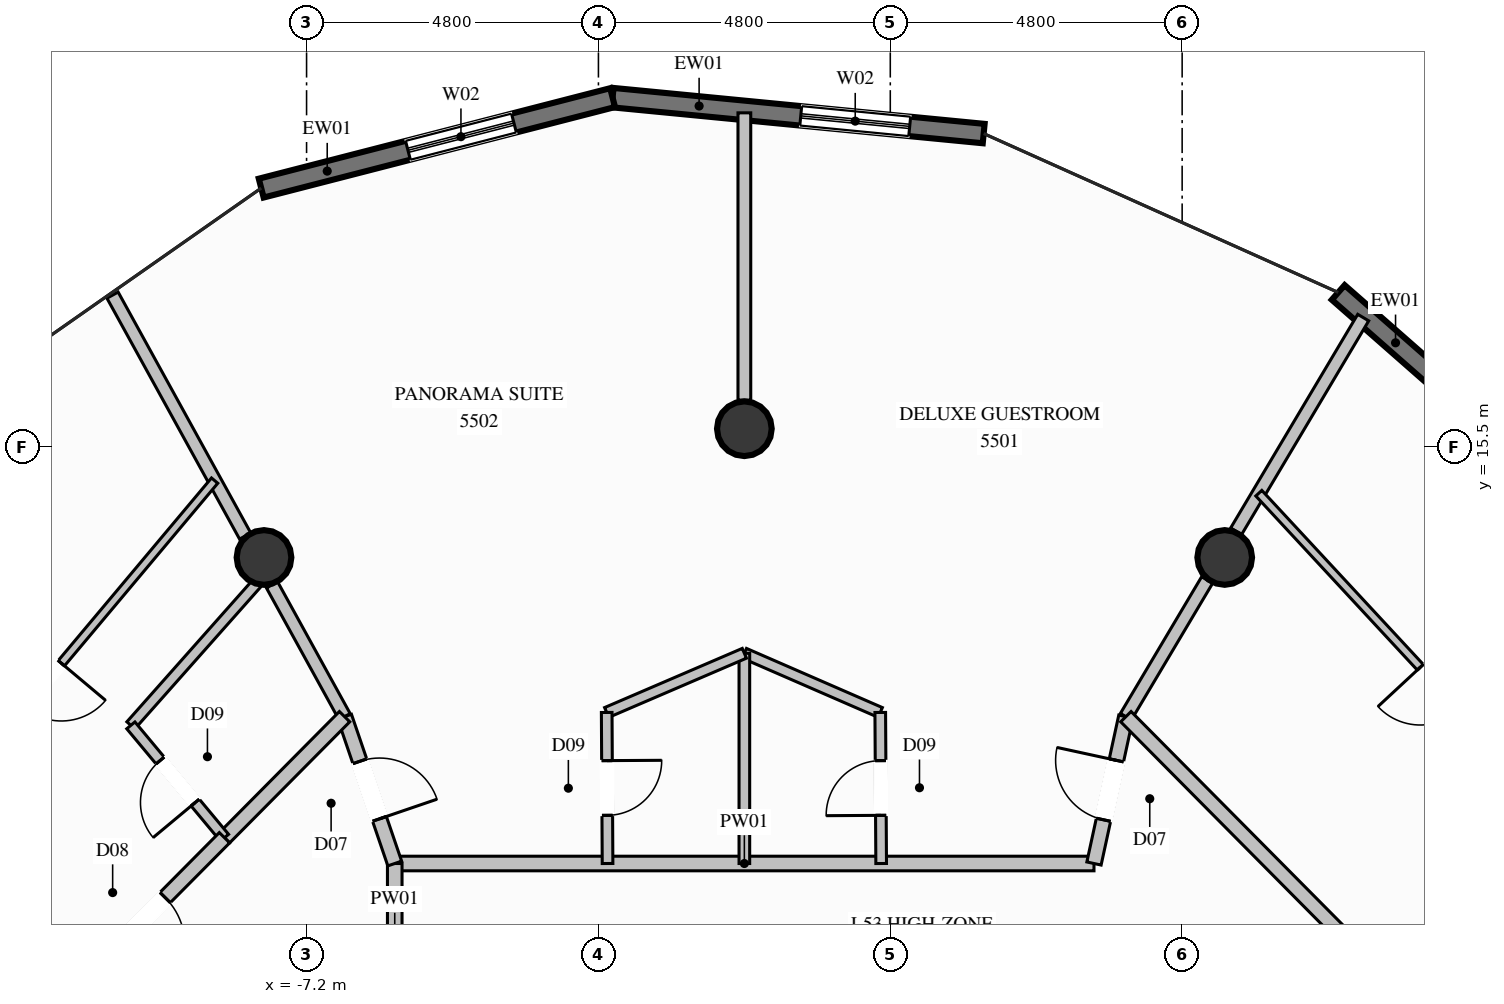
"""IFC4 building model, lengths in metres.
Left out: names, types, materials, properties, quantities, classifications, styles, units other than length and angle.
Written with IfcOpenShell. Run it as: python <this file> out.ifc"""

import sys

from ifc_helpers import new_model, si_unit, direction, frame, frame_2d, origin, origin_2d, place, context, subcontext, project, spatial, rectangle, circle, extrude, element, fill, save


model = new_model("IFC4")
c1 = context("Model", 3, precision=1e-05, world=origin(), true_north=direction((0.0, 1.0)))
c2 = subcontext(c1, "Body", "Model", "MODEL_VIEW")
j1 = project(units=[si_unit("LENGTHUNIT", "METRE"), si_unit("PLANEANGLEUNIT", "RADIAN")], contexts=[c1])
p1 = place(None, origin())
s1 = spatial("IfcSite", under=j1, at=p1, CompositionType="ELEMENT")
p2 = place(p1, origin())
s2 = spatial("IfcBuilding", under=s1, at=p2, CompositionType="ELEMENT")
p3 = place(p2, frame((0.0, 0.0, 205.6)))
s3 = spatial("IfcBuildingStorey", under=s2, at=p3, CompositionType="ELEMENT", Elevation=205.6)
for number, where, z_axis, x_axis in (
    (1, (7.9, 13.683, 0.0), (0.0, 0.0, 1.0), (1.0, 0.0, 0.0)),
    (2, (0.0, 15.8, 0.0), (0.0, 0.0, 1.0), (1.0, 0.0, 0.0)),
    (3, (-7.9, 13.683, 0.0), (0.0, 0.0, 1.0), (1.0, 0.0, 0.0)),
):
    element("IfcColumn", number, at=place(p3, frame(where, z_axis=z_axis, x_axis=x_axis)), inside=s3, PredefinedType="COLUMN", context=c2, shape_type="SweptSolid", body=[
        extrude(circle(Radius=0.45, at=origin_2d()), origin(), (0.0, 0.0, 1.0), 3.6),
    ])
p4 = place(p3, frame((9.767, 18.041, 0.0), z_axis=(0.0, 0.0, 1.0), x_axis=(0.751422430331, -0.659821438873, 0.0)))
e4 = element("IfcWall", 4, at=p4, inside=s3, PredefinedType="SOLIDWALL", context=c2, shape_type="SweptSolid", body=[
    extrude(rectangle(XDim=6.636, YDim=0.32, at=frame_2d((3.318, 0.0))), origin(), (0.0, 0.0, 1.0), 3.36),
])
p5 = place(p4, frame((2.759, 0.0, 0.35)))
e5 = element("IfcOpeningElement", 5, at=p5, cuts=e4, PredefinedType="OPENING", context=c2, shape_type="SweptSolid", body=[
    extrude(rectangle(XDim=1.8, YDim=2.6, at=frame_2d((0.9, 1.3))), frame((0.0, 0.17, 0.0), z_axis=(0.0, -1.0, 0.0), x_axis=(1.0, 0.0, 0.0)), (0.0, 0.0, 1.0), 0.34),
])
p6 = place(p3, frame((-2.167, 21.245, 0.0), z_axis=(0.0, 0.0, 1.0), x_axis=(0.995342991644, -0.096396727049, 0.0)))
e6 = element("IfcWall", 6, at=p6, inside=s3, PredefinedType="SOLIDWALL", context=c2, shape_type="SweptSolid", body=[
    extrude(rectangle(XDim=6.132, YDim=0.32, at=frame_2d((3.066, 0.0))), origin(), (0.0, 0.0, 1.0), 3.36),
])
p7 = place(p6, frame((3.109, 0.0, 0.35)))
e7 = element("IfcOpeningElement", 7, at=p7, cuts=e6, PredefinedType="OPENING", context=c2, shape_type="SweptSolid", body=[
    extrude(rectangle(XDim=1.8, YDim=2.6, at=frame_2d((0.9, 1.3))), frame((0.0, 0.17, 0.0), z_axis=(0.0, -1.0, 0.0), x_axis=(1.0, 0.0, 0.0)), (0.0, 0.0, 1.0), 0.34),
])
p8 = place(p3, frame((-7.946, 19.757, 0.0), z_axis=(0.0, 0.0, 1.0), x_axis=(0.968412249537, 0.249354596803, 0.0)))
e8 = element("IfcWall", 8, at=p8, inside=s3, PredefinedType="SOLIDWALL", context=c2, shape_type="SweptSolid", body=[
    extrude(rectangle(XDim=5.968, YDim=0.32, at=frame_2d((2.984, 0.0))), origin(), (0.0, 0.0, 1.0), 3.36),
])
p9 = place(p8, frame((2.492, 0.0, 0.35)))
e9 = element("IfcOpeningElement", 9, at=p9, cuts=e8, PredefinedType="OPENING", context=c2, shape_type="SweptSolid", body=[
    extrude(rectangle(XDim=1.8, YDim=2.6, at=frame_2d((0.9, 1.3))), frame((0.0, 0.17, 0.0), z_axis=(0.0, -1.0, 0.0), x_axis=(1.0, 0.0, 0.0)), (0.0, 0.0, 1.0), 0.34),
])
p10 = place(p3, frame((-5.75, 8.65, 0.0), z_axis=(0.0, 0.0, 1.0), x_axis=(1.0, 0.0, 0.0)))
e10 = element("IfcWall", 10, at=p10, inside=s3, PredefinedType="PARTITIONING", context=c2, shape_type="SweptSolid", body=[
    extrude(rectangle(XDim=11.5, YDim=0.24, at=frame_2d((5.75, 0.0))), origin(), (0.0, 0.0, 1.0), 3.36),
])
p11 = place(p3, frame((-5.75, 6.1, 0.0), z_axis=(0.0, 0.0, 1.0), x_axis=(0.0, 1.0, 0.0)))
e11 = element("IfcWall", 11, at=p11, inside=s3, PredefinedType="PARTITIONING", context=c2, shape_type="SweptSolid", body=[
    extrude(rectangle(XDim=2.55, YDim=0.24, at=frame_2d((1.275, 0.0))), origin(), (0.0, 0.0, 1.0), 3.36),
])
p12 = place(p3, frame((6.275, 11.065, 0.0), z_axis=(0.0, 0.0, 1.0), x_axis=(0.511099633632, 0.859521474136, 0.0)))
e12 = element("IfcWall", 12, at=p12, inside=s3, PredefinedType="PARTITIONING", context=c2, shape_type="SweptSolid", body=[
    extrude(rectangle(XDim=2.614, YDim=0.21, at=frame_2d((1.307, 0.0))), origin(), (0.0, 0.0, 1.0), 2.877),
])
p13 = place(p3, frame((8.088, 14.114, 0.0), z_axis=(0.0, 0.0, 1.0), x_axis=(0.511207736288, 0.859457183552, 0.0)))
e13 = element("IfcWall", 13, at=p13, inside=s3, PredefinedType="PARTITIONING", context=c2, shape_type="SweptSolid", body=[
    extrude(rectangle(XDim=4.089, YDim=0.21, at=frame_2d((2.044, 0.0))), origin(), (0.0, 0.0, 1.0), 3.36),
])
p14 = place(p3, frame((-6.575, 11.065, 0.0), z_axis=(0.0, 0.0, 1.0), x_axis=(-0.482312715348, 0.875999112222, 0.0)))
e14 = element("IfcWall", 14, at=p14, inside=s3, PredefinedType="PARTITIONING", context=c2, shape_type="SweptSolid", body=[
    extrude(rectangle(XDim=2.474, YDim=0.21, at=frame_2d((1.237, 0.0))), origin(), (0.0, 0.0, 1.0), 2.877),
])
p15 = place(p3, frame((-8.21, 14.036, 0.0), z_axis=(0.0, 0.0, 1.0), x_axis=(-0.482343563711, 0.875982126842, 0.0)))
e15 = element("IfcWall", 15, at=p15, inside=s3, PredefinedType="PARTITIONING", context=c2, shape_type="SweptSolid", body=[
    extrude(rectangle(XDim=4.522, YDim=0.21, at=frame_2d((2.261, 0.0))), origin(), (0.0, 0.0, 1.0), 3.36),
])
p16 = place(p3, frame((0.0, 12.107, 0.0), z_axis=(0.0, 0.0, 1.0), x_axis=(0.916902788215, -0.399110607431, 0.0)))
e16 = element("IfcWall", 16, at=p16, inside=s3, PredefinedType="PLUMBINGWALL", context=c2, shape_type="SweptSolid", body=[
    extrude(rectangle(XDim=2.438, YDim=0.175, at=frame_2d((1.219, 0.0))), origin(), (0.0, 0.0, 1.0), 3.36),
])
p17 = place(p3, frame((0.0, 12.107, 0.0), z_axis=(0.0, 0.0, 1.0), x_axis=(0.0, -1.0, 0.0)))
e17 = element("IfcWall", 17, at=p17, inside=s3, PredefinedType="PLUMBINGWALL", context=c2, shape_type="SweptSolid", body=[
    extrude(rectangle(XDim=3.457, YDim=0.175, at=frame_2d((1.729, 0.0))), origin(), (0.0, 0.0, 1.0), 3.36),
])
p18 = place(p3, frame((2.25, 8.65, 0.0), z_axis=(0.0, 0.0, 1.0), x_axis=(-0.005994978263, 0.999982029956, 0.0)))
e18 = element("IfcWall", 18, at=p18, inside=s3, PredefinedType="PLUMBINGWALL", context=c2, shape_type="SweptSolid", body=[
    extrude(rectangle(XDim=2.484, YDim=0.175, at=frame_2d((1.242, 0.0))), origin(), (0.0, 0.0, 1.0), 3.36),
])
p19 = place(p18, frame((0.792, 0.0, 0.0)))
e19 = element("IfcOpeningElement", 19, at=p19, cuts=e18, PredefinedType="OPENING", context=c2, shape_type="SweptSolid", body=[
    extrude(rectangle(XDim=0.9, YDim=2.1, at=frame_2d((0.45, 1.05))), frame((0.0, 0.098, 0.0), z_axis=(0.0, -1.0, 0.0), x_axis=(1.0, 0.0, 0.0)), (0.0, 0.0, 1.0), 0.195),
])
p20 = place(p3, frame((0.0, 16.27, 0.0), z_axis=(0.0, 0.0, 1.0), x_axis=(0.0, 1.0, 0.0)))
e20 = element("IfcWall", 20, at=p20, inside=s3, PredefinedType="PARTITIONING", context=c2, shape_type="SweptSolid", body=[
    extrude(rectangle(XDim=4.725, YDim=0.21, at=frame_2d((2.363, 0.0))), origin(), (0.0, 0.0, 1.0), 3.36),
])
p21 = place(p3, frame((5.75, 8.65, 0.0), z_axis=(0.0, 0.0, 1.0), x_axis=(0.212388632151, 0.977185278713, 0.0)))
e21 = element("IfcWall", 21, at=p21, inside=s3, PredefinedType="PARTITIONING", context=c2, shape_type="SweptSolid", body=[
    extrude(rectangle(XDim=2.471, YDim=0.24, at=frame_2d((1.236, 0.0))), origin(), (0.0, 0.0, 1.0), 3.36),
])
p22 = place(p21, frame((0.736, 0.0, 0.0)))
e22 = element("IfcOpeningElement", 22, at=p22, cuts=e21, PredefinedType="OPENING", context=c2, shape_type="SweptSolid", body=[
    extrude(rectangle(XDim=1.0, YDim=2.2, at=frame_2d((0.5, 1.1))), frame((0.0, 0.13, 0.0), z_axis=(0.0, -1.0, 0.0), x_axis=(1.0, 0.0, 0.0)), (0.0, 0.0, 1.0), 0.26),
])
p23 = place(p3, frame((-2.264, 11.134, 0.0), z_axis=(0.0, 0.0, 1.0), x_axis=(0.918755099671, 0.3948278952, 0.0)))
e23 = element("IfcWall", 23, at=p23, inside=s3, PredefinedType="PLUMBINGWALL", context=c2, shape_type="SweptSolid", body=[
    extrude(rectangle(XDim=2.464, YDim=0.175, at=frame_2d((1.232, 0.0))), origin(), (0.0, 0.0, 1.0), 3.36),
])
p24 = place(p3, frame((-2.264, 11.134, 0.0), z_axis=(0.0, 0.0, 1.0), x_axis=(0.005601877704, -0.99998430936, 0.0)))
e24 = element("IfcWall", 24, at=p24, inside=s3, PredefinedType="PLUMBINGWALL", context=c2, shape_type="SweptSolid", body=[
    extrude(rectangle(XDim=2.484, YDim=0.175, at=frame_2d((1.242, 0.0))), origin(), (0.0, 0.0, 1.0), 3.36),
])
p25 = place(p24, frame((0.792, 0.0, 0.0)))
e25 = element("IfcOpeningElement", 25, at=p25, cuts=e24, PredefinedType="OPENING", context=c2, shape_type="SweptSolid", body=[
    extrude(rectangle(XDim=0.9, YDim=2.1, at=frame_2d((0.45, 1.05))), frame((0.0, 0.098, 0.0), z_axis=(0.0, -1.0, 0.0), x_axis=(1.0, 0.0, 0.0)), (0.0, 0.0, 1.0), 0.195),
])
p26 = place(p3, frame((-6.575, 11.065, 0.0), z_axis=(0.0, 0.0, 1.0), x_axis=(0.323250422642, -0.946313459833, 0.0)))
e26 = element("IfcWall", 26, at=p26, inside=s3, PredefinedType="PARTITIONING", context=c2, shape_type="SweptSolid", body=[
    extrude(rectangle(XDim=2.552, YDim=0.24, at=frame_2d((1.276, 0.0))), origin(), (0.0, 0.0, 1.0), 3.36),
])
p27 = place(p26, frame((0.776, 0.0, 0.0)))
e27 = element("IfcOpeningElement", 27, at=p27, cuts=e26, PredefinedType="OPENING", context=c2, shape_type="SweptSolid", body=[
    extrude(rectangle(XDim=1.0, YDim=2.2, at=frame_2d((0.5, 1.1))), frame((0.0, 0.13, 0.0), z_axis=(0.0, -1.0, 0.0), x_axis=(1.0, 0.0, 0.0)), (0.0, 0.0, 1.0), 0.26),
])
p28 = place(p3, frame((-6.575, 11.065, 0.0), z_axis=(0.0, 0.0, 1.0), x_axis=(-0.704271845888, -0.709930395947, 0.0)))
e28 = element("IfcWall", 28, at=p28, inside=s3, PredefinedType="PARTITIONING", context=c2, shape_type="SweptSolid", body=[
    extrude(rectangle(XDim=2.804, YDim=0.24, at=frame_2d((1.402, 0.0))), origin(), (0.0, 0.0, 1.0), 3.36),
])
p29 = place(p3, frame((-7.872, 13.422, 0.0), z_axis=(0.0, 0.0, 1.0), x_axis=(-0.663660752153, -0.748033693126, 0.0)))
e29 = element("IfcWall", 29, at=p29, inside=s3, PredefinedType="PLUMBINGWALL", context=c2, shape_type="SweptSolid", body=[
    extrude(rectangle(XDim=3.342, YDim=0.175, at=frame_2d((1.671, 0.0))), origin(), (0.0, 0.0, 1.0), 2.929),
])
p30 = place(p3, frame((-8.55, 9.074, 0.0), z_axis=(0.0, 0.0, 1.0), x_axis=(-0.640164435278, 0.768237916147, 0.0)))
e30 = element("IfcWall", 30, at=p30, inside=s3, PredefinedType="PLUMBINGWALL", context=c2, shape_type="SweptSolid", body=[
    extrude(rectangle(XDim=2.406, YDim=0.175, at=frame_2d((1.203, 0.0))), origin(), (0.0, 0.0, 1.0), 3.36),
])
p31 = place(p30, frame((0.753, 0.0, 0.0)))
e31 = element("IfcOpeningElement", 31, at=p31, cuts=e30, PredefinedType="OPENING", context=c2, shape_type="SweptSolid", body=[
    extrude(rectangle(XDim=0.9, YDim=2.1, at=frame_2d((0.45, 1.05))), frame((0.0, 0.098, 0.0), z_axis=(0.0, -1.0, 0.0), x_axis=(1.0, 0.0, 0.0)), (0.0, 0.0, 1.0), 0.195),
])
p32 = place(p3, frame((-8.55, 9.074, 0.0), z_axis=(0.0, 0.0, 1.0), x_axis=(-0.704390934975, -0.709812236246, 0.0)))
e32 = element("IfcWall", 32, at=p32, inside=s3, PredefinedType="PARTITIONING", context=c2, shape_type="SweptSolid", body=[
    extrude(rectangle(XDim=3.873, YDim=0.24, at=frame_2d((1.937, 0.0))), origin(), (0.0, 0.0, 1.0), 3.36),
])
p33 = place(p32, frame((1.386, 0.0, 0.0)))
e33 = element("IfcOpeningElement", 33, at=p33, cuts=e32, PredefinedType="OPENING", context=c2, shape_type="SweptSolid", body=[
    extrude(rectangle(XDim=1.1, YDim=2.3, at=frame_2d((0.55, 1.15))), frame((0.0, 0.13, 0.0), z_axis=(0.0, -1.0, 0.0), x_axis=(1.0, 0.0, 0.0)), (0.0, 0.0, 1.0), 0.26),
])
p34 = place(p3, frame((-8.712, 14.947, 0.0), z_axis=(0.0, 0.0, 1.0), x_axis=(-0.642897719882, -0.765952036208, 0.0)))
e34 = element("IfcWall", 34, at=p34, inside=s3, PredefinedType="PARTITIONING", context=c2, shape_type="SweptSolid", body=[
    extrude(rectangle(XDim=8.793, YDim=0.135, at=frame_2d((4.396, 0.0))), origin(), (0.0, 0.0, 1.0), 3.36),
])
p35 = place(p34, frame((3.921, 0.0, 0.0)))
e35 = element("IfcOpeningElement", 35, at=p35, cuts=e34, PredefinedType="OPENING", context=c2, shape_type="SweptSolid", body=[
    extrude(rectangle(XDim=0.95, YDim=2.1, at=frame_2d((0.475, 1.05))), frame((0.0, 0.078, 0.0), z_axis=(0.0, -1.0, 0.0), x_axis=(1.0, 0.0, 0.0)), (0.0, 0.0, 1.0), 0.155),
])
p36 = place(p3, frame((10.978, 6.325, 0.0), z_axis=(0.0, 0.0, 1.0), x_axis=(-0.704340920508, 0.709861865223, 0.0)))
e36 = element("IfcWall", 36, at=p36, inside=s3, PredefinedType="PARTITIONING", context=c2, shape_type="SweptSolid", body=[
    extrude(rectangle(XDim=6.677, YDim=0.24, at=frame_2d((3.339, 0.0))), origin(), (0.0, 0.0, 1.0), 3.36),
])
p37 = place(p3, frame((14.418, 8.319, 0.0), z_axis=(0.0, 0.0, 1.0), x_axis=(-0.680130290057, 0.733091255266, 0.0)))
e37 = element("IfcWall", 37, at=p37, inside=s3, PredefinedType="PARTITIONING", context=c2, shape_type="SweptSolid", body=[
    extrude(rectangle(XDim=8.759, YDim=0.135, at=frame_2d((4.379, 0.0))), origin(), (0.0, 0.0, 1.0), 3.36),
])
p38 = place(p37, frame((3.904, 0.0, 0.0)))
e38 = element("IfcOpeningElement", 38, at=p38, cuts=e37, PredefinedType="OPENING", context=c2, shape_type="SweptSolid", body=[
    extrude(rectangle(XDim=0.95, YDim=2.1, at=frame_2d((0.475, 1.05))), frame((0.0, 0.078, 0.0), z_axis=(0.0, -1.0, 0.0), x_axis=(1.0, 0.0, 0.0)), (0.0, 0.0, 1.0), 0.155),
])
p39 = place(p7, origin())
e39 = element("IfcWindow", 39, at=p39, inside=s3, PartitioningType="SINGLE_PANEL", PredefinedType="WINDOW", context=c2, shape_type="SweptSolid", body=[
    extrude(rectangle(XDim=1.8, YDim=2.6, at=frame_2d((0.9, 1.3))), frame((0.0, 0.03, 0.0), z_axis=(0.0, -1.0, 0.0), x_axis=(1.0, 0.0, 0.0)), (0.0, 0.0, 1.0), 0.06),
])
fill(e7, e39)
p40 = place(p9, origin())
e40 = element("IfcWindow", 40, at=p40, inside=s3, PartitioningType="SINGLE_PANEL", PredefinedType="WINDOW", context=c2, shape_type="SweptSolid", body=[
    extrude(rectangle(XDim=1.8, YDim=2.6, at=frame_2d((0.9, 1.3))), frame((0.0, 0.03, 0.0), z_axis=(0.0, -1.0, 0.0), x_axis=(1.0, 0.0, 0.0)), (0.0, 0.0, 1.0), 0.06),
])
fill(e9, e40)
p41 = place(p19, origin())
e41 = element("IfcDoor", 41, at=p41, inside=s3, OperationType="SINGLE_SWING_LEFT", PredefinedType="DOOR", context=c2, shape_type="SweptSolid", body=[
    extrude(rectangle(XDim=0.9, YDim=2.1, at=frame_2d((0.45, 1.05))), frame((0.0, 0.025, 0.0), z_axis=(0.0, -1.0, 0.0), x_axis=(1.0, 0.0, 0.0)), (0.0, 0.0, 1.0), 0.05),
])
fill(e19, e41)
p42 = place(p22, origin())
e42 = element("IfcDoor", 42, at=p42, inside=s3, OperationType="SINGLE_SWING_RIGHT", PredefinedType="DOOR", context=c2, shape_type="SweptSolid", body=[
    extrude(rectangle(XDim=1.0, YDim=2.2, at=frame_2d((0.5, 1.1))), frame((0.0, 0.025, 0.0), z_axis=(0.0, -1.0, 0.0), x_axis=(1.0, 0.0, 0.0)), (0.0, 0.0, 1.0), 0.05),
])
fill(e22, e42)
p43 = place(p25, origin())
e43 = element("IfcDoor", 43, at=p43, inside=s3, OperationType="SINGLE_SWING_LEFT", PredefinedType="DOOR", context=c2, shape_type="SweptSolid", body=[
    extrude(rectangle(XDim=0.9, YDim=2.1, at=frame_2d((0.45, 1.05))), frame((0.0, 0.025, 0.0), z_axis=(0.0, -1.0, 0.0), x_axis=(1.0, 0.0, 0.0)), (0.0, 0.0, 1.0), 0.05),
])
fill(e25, e43)
p44 = place(p27, origin())
e44 = element("IfcDoor", 44, at=p44, inside=s3, OperationType="SINGLE_SWING_RIGHT", PredefinedType="DOOR", context=c2, shape_type="SweptSolid", body=[
    extrude(rectangle(XDim=1.0, YDim=2.2, at=frame_2d((0.5, 1.1))), frame((0.0, 0.025, 0.0), z_axis=(0.0, -1.0, 0.0), x_axis=(1.0, 0.0, 0.0)), (0.0, 0.0, 1.0), 0.05),
])
fill(e27, e44)
p45 = place(p31, origin())
e45 = element("IfcDoor", 45, at=p45, inside=s3, OperationType="SINGLE_SWING_LEFT", PredefinedType="DOOR", context=c2, shape_type="SweptSolid", body=[
    extrude(rectangle(XDim=0.9, YDim=2.1, at=frame_2d((0.45, 1.05))), frame((0.0, 0.025, 0.0), z_axis=(0.0, -1.0, 0.0), x_axis=(1.0, 0.0, 0.0)), (0.0, 0.0, 1.0), 0.05),
])
fill(e31, e45)
p46 = place(p33, origin())
e46 = element("IfcDoor", 46, at=p46, inside=s3, OperationType="SINGLE_SWING_RIGHT", PredefinedType="DOOR", context=c2, shape_type="SweptSolid", body=[
    extrude(rectangle(XDim=1.1, YDim=2.3, at=frame_2d((0.55, 1.15))), frame((0.0, 0.025, 0.0), z_axis=(0.0, -1.0, 0.0), x_axis=(1.0, 0.0, 0.0)), (0.0, 0.0, 1.0), 0.05),
])
fill(e33, e46)
p47 = place(p35, origin())
e47 = element("IfcDoor", 47, at=p47, inside=s3, OperationType="SINGLE_SWING_LEFT", PredefinedType="DOOR", context=c2, shape_type="SweptSolid", body=[
    extrude(rectangle(XDim=0.95, YDim=2.1, at=frame_2d((0.475, 1.05))), frame((0.0, 0.025, 0.0), z_axis=(0.0, -1.0, 0.0), x_axis=(1.0, 0.0, 0.0)), (0.0, 0.0, 1.0), 0.05),
])
fill(e35, e47)
p48 = place(p38, origin())
e48 = element("IfcDoor", 48, at=p48, inside=s3, OperationType="SINGLE_SWING_RIGHT", PredefinedType="DOOR", context=c2, shape_type="SweptSolid", body=[
    extrude(rectangle(XDim=0.95, YDim=2.1, at=frame_2d((0.475, 1.05))), frame((0.0, 0.025, 0.0), z_axis=(0.0, -1.0, 0.0), x_axis=(1.0, 0.0, 0.0)), (0.0, 0.0, 1.0), 0.05),
])
fill(e38, e48)
save(model, sys.argv[1])
